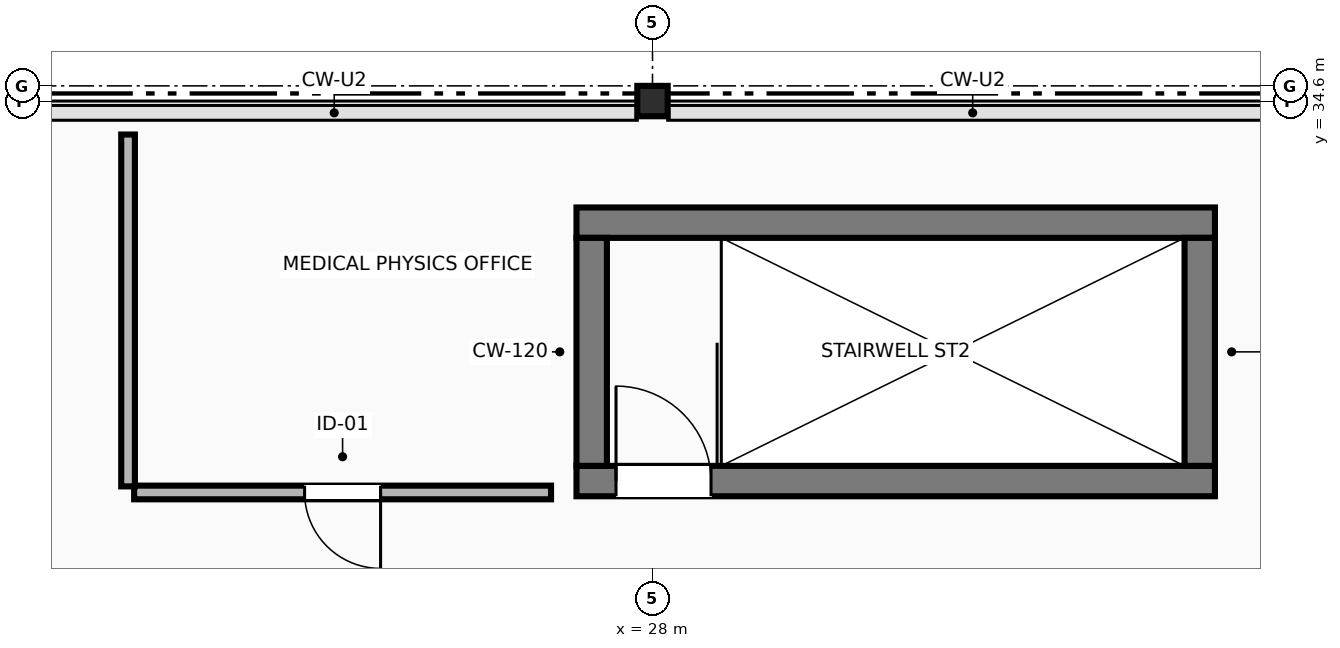
"""IFC4 building model, lengths in metres.
Left out: names, types, materials, properties, quantities, classifications, styles, units other than length and angle.
Written with IfcOpenShell. Run it as: python <this file> out.ifc"""

import sys

from ifc_helpers import new_model, si_unit, direction, frame, frame_2d, origin, origin_2d, place, context, subcontext, project, spatial, rectangle, extrude, element, fill, save


model = new_model("IFC4")
c1 = context("Model", 3, precision=1e-05, world=origin(), true_north=direction((0.0, 1.0)))
c2 = subcontext(c1, "Body", "Model", "MODEL_VIEW")
j1 = project(units=[si_unit("LENGTHUNIT", "METRE"), si_unit("PLANEANGLEUNIT", "RADIAN")], contexts=[c1])
p1 = place(None, origin())
s1 = spatial("IfcSite", under=j1, at=p1, CompositionType="ELEMENT")
p2 = place(p1, origin())
s2 = spatial("IfcBuilding", under=s1, at=p2, CompositionType="ELEMENT")
p3 = place(p2, frame((0.0, 0.0, 22.2)))
s3 = spatial("IfcBuildingStorey", under=s2, at=p3, CompositionType="ELEMENT", Elevation=22.2)
p4 = place(p3, frame((28.0, 34.6, 0.0), z_axis=(0.0, 0.0, 1.0), x_axis=(1.0, 0.0, 0.0)))
e1 = element("IfcColumn", 1, at=p4, inside=s3, PredefinedType="COLUMN", context=c2, shape_type="SweptSolid", body=[
    extrude(rectangle(XDim=0.4, YDim=0.4, at=origin_2d()), origin(), (0.0, 0.0, 1.0), 4.2),
])
p5 = place(p3, frame((27.0, 29.6, 0.0), z_axis=(0.0, 0.0, 1.0), x_axis=(1.0, 0.0, 0.0)))
e2 = element("IfcWall", 2, at=p5, inside=s3, PredefinedType="SHEAR", context=c2, shape_type="SweptSolid", body=[
    extrude(rectangle(XDim=8.4, YDim=0.4, at=frame_2d((4.2, 0.0))), origin(), (0.0, 0.0, 1.0), 3.92),
])
p6 = place(p5, frame((0.52, 0.0, 0.0)))
e3 = element("IfcOpeningElement", 3, at=p6, cuts=e2, PredefinedType="OPENING", context=c2, shape_type="SweptSolid", body=[
    extrude(rectangle(XDim=1.25, YDim=2.2, at=frame_2d((0.625, 1.1))), frame((0.0, 0.21, 0.0), z_axis=(0.0, -1.0, 0.0), x_axis=(1.0, 0.0, 0.0)), (0.0, 0.0, 1.0), 0.42),
])
p7 = place(p3, frame((35.4, 33.0, 0.0), z_axis=(0.0, 0.0, 1.0), x_axis=(-1.0, 0.0, 0.0)))
e4 = element("IfcWall", 4, at=p7, inside=s3, PredefinedType="SHEAR", context=c2, shape_type="SweptSolid", body=[
    extrude(rectangle(XDim=8.4, YDim=0.4, at=frame_2d((4.2, 0.0))), origin(), (0.0, 0.0, 1.0), 3.92),
])
for number, where, z_axis, x_axis in (
    (5, (27.2, 29.8, 0.0), (0.0, 0.0, 1.0), (0.0, 1.0, 0.0)),
    (6, (35.2, 32.8, 0.0), (0.0, 0.0, 1.0), (0.0, -1.0, 0.0)),
):
    element("IfcWall", number, at=place(p3, frame(where, z_axis=z_axis, x_axis=x_axis)), inside=s3, PredefinedType="SHEAR", context=c2, shape_type="SweptSolid", body=[
        extrude(rectangle(XDim=3.0, YDim=0.4, at=frame_2d((1.5, 0.0))), origin(), (0.0, 0.0, 1.0), 3.92),
    ])
p8 = place(p3, frame((26.665, 29.45, 0.0), z_axis=(0.0, 0.0, 1.0), x_axis=(-1.0, 0.0, 0.0)))
e7 = element("IfcWall", 7, at=p8, inside=s3, PredefinedType="PARTITIONING", context=c2, shape_type="SweptSolid", body=[
    extrude(rectangle(XDim=5.485, YDim=0.18, at=frame_2d((2.743, 0.0))), origin(), (0.0, 0.0, 1.0), 3.92),
])
p9 = place(p8, frame((2.242, 0.0, 0.0)))
e8 = element("IfcOpeningElement", 8, at=p9, cuts=e7, PredefinedType="OPENING", context=c2, shape_type="SweptSolid", body=[
    extrude(rectangle(XDim=1.0, YDim=2.15, at=frame_2d((0.5, 1.075))), frame((0.0, 0.1, 0.0), z_axis=(0.0, -1.0, 0.0), x_axis=(1.0, 0.0, 0.0)), (0.0, 0.0, 1.0), 0.2),
])
p10 = place(p3, frame((21.1, 29.53, 0.0), z_axis=(0.0, 0.0, 1.0), x_axis=(0.0, 1.0, 0.0)))
e9 = element("IfcWall", 9, at=p10, inside=s3, PredefinedType="PARTITIONING", context=c2, shape_type="SweptSolid", body=[
    extrude(rectangle(XDim=4.63, YDim=0.18, at=frame_2d((2.315, 0.0))), origin(), (0.0, 0.0, 1.0), 3.92),
])
p11 = place(p6, origin())
e10 = element("IfcDoor", 10, at=p11, inside=s3, OperationType="SINGLE_SWING_LEFT", PredefinedType="DOOR", context=c2, shape_type="SweptSolid", body=[
    extrude(rectangle(XDim=1.25, YDim=2.2, at=frame_2d((0.625, 1.1))), frame((0.0, 0.025, 0.0), z_axis=(0.0, -1.0, 0.0), x_axis=(1.0, 0.0, 0.0)), (0.0, 0.0, 1.0), 0.05),
])
fill(e3, e10)
p12 = place(p9, origin())
e11 = element("IfcDoor", 11, at=p12, inside=s3, OperationType="SINGLE_SWING_LEFT", PredefinedType="DOOR", context=c2, shape_type="SweptSolid", body=[
    extrude(rectangle(XDim=1.0, YDim=2.15, at=frame_2d((0.5, 1.075))), frame((0.0, 0.025, 0.0), z_axis=(0.0, -1.0, 0.0), x_axis=(1.0, 0.0, 0.0)), (0.0, 0.0, 1.0), 0.05),
])
fill(e8, e11)
save(model, sys.argv[1])
